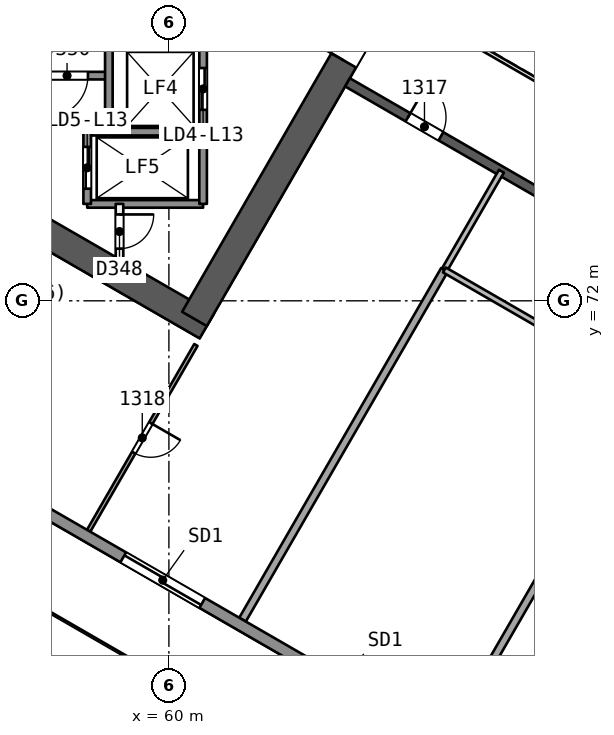
"""IFC4 building model, lengths in metres.
Left out: names, types, materials, properties, quantities, classifications, styles, units other than length and angle.
Written with IfcOpenShell. Run it as: python <this file> out.ifc"""

import sys

from ifc_helpers import new_model, si_unit, direction, frame, frame_2d, origin, place, context, subcontext, project, spatial, rectangle, extrude, element, fill, save


model = new_model("IFC4")
c1 = context("Model", 3, precision=1e-05, world=origin(), true_north=direction((0.0, 1.0)))
c2 = subcontext(c1, "Body", "Model", "MODEL_VIEW")
j1 = project(units=[si_unit("LENGTHUNIT", "METRE"), si_unit("PLANEANGLEUNIT", "RADIAN")], contexts=[c1])
p1 = place(None, origin())
s1 = spatial("IfcSite", under=j1, at=p1, CompositionType="ELEMENT")
p2 = place(p1, origin())
s2 = spatial("IfcBuilding", under=s1, at=p2, CompositionType="ELEMENT")
p3 = place(p2, frame((0.0, 0.0, 61.0)))
s3 = spatial("IfcBuildingStorey", under=s2, at=p3, CompositionType="ELEMENT", Elevation=61.0)
p4 = place(p3, frame((48.772, 78.394, 0.0), z_axis=(0.0, 0.0, 1.0), x_axis=(0.866028339916, -0.499994914436, 0.0)))
e1 = element("IfcWall", 1, at=p4, inside=s3, PredefinedType="SHEAR", context=c2, shape_type="SweptSolid", body=[
    extrude(rectangle(XDim=14.117, YDim=0.75, at=frame_2d((7.059, 0.0))), origin(), (0.0, 0.0, 1.0), 3.7),
])
p5 = place(p3, frame((60.673, 71.523, 0.0), z_axis=(0.0, 0.0, 1.0), x_axis=(0.499997052475, 0.866027105532, 0.0)))
e2 = element("IfcWall", 2, at=p5, inside=s3, PredefinedType="SHEAR", context=c2, shape_type="SweptSolid", body=[
    extrude(rectangle(XDim=10.005, YDim=0.75, at=frame_2d((5.002, 0.0))), origin(), (0.0, 0.0, 1.0), 3.7),
])
p6 = place(p5, frame((7.855, 0.0, 0.0)))
e3 = element("IfcOpeningElement", 3, at=p6, cuts=e2, PredefinedType="OPENING", context=c2, shape_type="SweptSolid", body=[
    extrude(rectangle(XDim=1.2, YDim=2.1, at=frame_2d((0.6, 1.05))), frame((0.0, 0.385, 0.0), z_axis=(0.0, -1.0, 0.0), x_axis=(1.0, 0.0, 0.0)), (0.0, 0.0, 1.0), 0.771),
])
p7 = place(p3, frame((64.7, 77.748, 0.0), z_axis=(0.0, 0.0, 1.0), x_axis=(0.866026492143, -0.499998114903, 0.0)))
e4 = element("IfcWall", 4, at=p7, inside=s3, PredefinedType="SHEAR", context=c2, shape_type="SweptSolid", body=[
    extrude(rectangle(XDim=15.588, YDim=0.25, at=frame_2d((7.794, 0.0))), origin(), (0.0, 0.0, 1.0), 3.2),
])
p8 = place(p7, frame((1.838, 0.0, 0.0)))
e5 = element("IfcOpeningElement", 5, at=p8, cuts=e4, PredefinedType="OPENING", context=c2, shape_type="SweptSolid", body=[
    extrude(rectangle(XDim=1.0, YDim=2.1, at=frame_2d((0.5, 1.05))), frame((0.0, 0.135, 0.0), z_axis=(0.0, -1.0, 0.0), x_axis=(1.0, 0.0, 0.0)), (0.0, 0.0, 1.0), 0.271),
])
p9 = place(p7, frame((8.694, 0.0, 0.0)))
e6 = element("IfcOpeningElement", 6, at=p9, cuts=e4, PredefinedType="OPENING", context=c2, shape_type="SweptSolid", body=[
    extrude(rectangle(XDim=1.1, YDim=2.1, at=frame_2d((0.55, 1.05))), frame((0.0, 0.135, 0.0), z_axis=(0.0, -1.0, 0.0), x_axis=(1.0, 0.0, 0.0)), (0.0, 0.0, 1.0), 0.271),
])
p10 = place(p7, frame((12.75, 0.0, 0.0)))
e7 = element("IfcOpeningElement", 7, at=p10, cuts=e4, PredefinedType="OPENING", context=c2, shape_type="SweptSolid", body=[
    extrude(rectangle(XDim=1.0, YDim=2.1, at=frame_2d((0.5, 1.05))), frame((0.0, 0.135, 0.0), z_axis=(0.0, -1.0, 0.0), x_axis=(1.0, 0.0, 0.0)), (0.0, 0.0, 1.0), 0.271),
])
p11 = place(p3, frame((60.71, 70.838, 0.0), z_axis=(0.0, 0.0, 1.0), x_axis=(-0.49999444814, -0.866028609128, 0.0)))
e8 = element("IfcWall", 8, at=p11, inside=s3, PredefinedType="PARTITIONING", context=c2, shape_type="SweptSolid", body=[
    extrude(rectangle(XDim=5.646, YDim=0.1, at=frame_2d((2.823, 0.0))), origin(), (0.0, 0.0, 1.0), 3.2),
])
p12 = place(p11, frame((2.373, 0.0, 0.0)))
e9 = element("IfcOpeningElement", 9, at=p12, cuts=e8, PredefinedType="OPENING", context=c2, shape_type="SweptSolid", body=[
    extrude(rectangle(XDim=0.9, YDim=2.1, at=frame_2d((0.45, 1.05))), frame((0.0, 0.061, 0.0), z_axis=(0.0, -1.0, 0.0), x_axis=(1.0, 0.0, 0.0)), (0.0, 0.0, 1.0), 0.121),
])
p13 = place(p3, frame((61.938, 63.61, 0.0), z_axis=(0.0, 0.0, 1.0), x_axis=(0.499994284652, 0.866028703517, 0.0)))
e10 = element("IfcWall", 10, at=p13, inside=s3, PredefinedType="PARTITIONING", context=c2, shape_type="SweptSolid", body=[
    extrude(rectangle(XDim=10.625, YDim=0.2, at=frame_2d((5.312, 0.0))), origin(), (0.0, 0.0, 1.0), 3.2),
])
p14 = place(p3, frame((67.25, 72.812, 0.0), z_axis=(0.0, 0.0, 1.0), x_axis=(0.499990139034, 0.866031096941, 0.0)))
e11 = element("IfcWall", 11, at=p14, inside=s3, PredefinedType="PARTITIONING", context=c2, shape_type="SweptSolid", body=[
    extrude(rectangle(XDim=3.0, YDim=0.15, at=frame_2d((1.5, 0.0))), origin(), (0.0, 0.0, 1.0), 3.2),
])
p15 = place(p3, frame((69.761, 71.362, 0.0), z_axis=(0.0, 0.0, 1.0), x_axis=(-0.866032775405, 0.499987231761, 0.0)))
e12 = element("IfcWall", 12, at=p15, inside=s3, PredefinedType="PARTITIONING", context=c2, shape_type="SweptSolid", body=[
    extrude(rectangle(XDim=2.9, YDim=0.15, at=frame_2d((1.45, 0.0))), origin(), (0.0, 0.0, 1.0), 3.2),
])
p16 = place(p3, frame((67.337, 60.493, 0.0), z_axis=(0.0, 0.0, 1.0), x_axis=(0.49999337185, 0.866029230515, 0.0)))
e13 = element("IfcWall", 13, at=p16, inside=s3, PredefinedType="PARTITIONING", context=c2, shape_type="SweptSolid", body=[
    extrude(rectangle(XDim=13.625, YDim=0.2, at=frame_2d((6.812, 0.0))), origin(), (0.0, 0.0, 1.0), 3.2),
])
p17 = place(p3, frame((90.555, 46.916, 0.0), z_axis=(0.0, 0.0, 1.0), x_axis=(-0.866024926003, 0.500000827541, 0.0)))
e14 = element("IfcWall", 14, at=p17, inside=s3, PredefinedType="SOLIDWALL", context=c2, shape_type="SweptSolid", body=[
    extrude(rectangle(XDim=60.025, YDim=0.3, at=frame_2d((30.013, 0.0))), origin(), (0.0, 0.0, 1.0), 3.2),
])
p18 = place(p17, frame((28.813, 0.0, 0.0)))
e15 = element("IfcOpeningElement", 15, at=p18, cuts=e14, PredefinedType="OPENING", context=c2, shape_type="SweptSolid", body=[
    extrude(rectangle(XDim=2.4, YDim=2.4, at=frame_2d((1.2, 1.2))), frame((0.0, 0.161, 0.0), z_axis=(0.0, -1.0, 0.0), x_axis=(1.0, 0.0, 0.0)), (0.0, 0.0, 1.0), 0.321),
])
p19 = place(p17, frame((34.269, 0.0, 0.0)))
e16 = element("IfcOpeningElement", 16, at=p19, cuts=e14, PredefinedType="OPENING", context=c2, shape_type="SweptSolid", body=[
    extrude(rectangle(XDim=2.4, YDim=2.4, at=frame_2d((1.2, 1.2))), frame((0.0, 0.161, 0.0), z_axis=(0.0, -1.0, 0.0), x_axis=(1.0, 0.0, 0.0)), (0.0, 0.0, 1.0), 0.321),
])
p20 = place(p17, frame((46.558, 0.0, 0.0)))
e17 = element("IfcOpeningElement", 17, at=p20, cuts=e14, PredefinedType="OPENING", context=c2, shape_type="SweptSolid", body=[
    extrude(rectangle(XDim=2.4, YDim=2.4, at=frame_2d((1.2, 1.2))), frame((0.0, 0.161, 0.0), z_axis=(0.0, -1.0, 0.0), x_axis=(1.0, 0.0, 0.0)), (0.0, 0.0, 1.0), 0.321),
])
p21 = place(p17, frame((23.357, 0.0, 0.0)))
e18 = element("IfcOpeningElement", 18, at=p21, cuts=e14, PredefinedType="OPENING", context=c2, shape_type="SweptSolid", body=[
    extrude(rectangle(XDim=2.4, YDim=2.4, at=frame_2d((1.2, 1.2))), frame((0.0, 0.161, 0.0), z_axis=(0.0, -1.0, 0.0), x_axis=(1.0, 0.0, 0.0)), (0.0, 0.0, 1.0), 0.321),
])
p22 = place(p17, frame((11.109, 0.0, 0.0)))
e19 = element("IfcOpeningElement", 19, at=p22, cuts=e14, PredefinedType="OPENING", context=c2, shape_type="SweptSolid", body=[
    extrude(rectangle(XDim=2.4, YDim=2.4, at=frame_2d((1.2, 1.2))), frame((0.0, 0.161, 0.0), z_axis=(0.0, -1.0, 0.0), x_axis=(1.0, 0.0, 0.0)), (0.0, 0.0, 1.0), 0.321),
])
p23 = place(p3, frame((58.42, 77.925, 0.0), z_axis=(0.0, 0.0, 1.0), x_axis=(-1.0, 0.0, 0.0)))
e20 = element("IfcWall", 20, at=p23, inside=s3, PredefinedType="SOLIDWALL", context=c2, shape_type="SweptSolid", body=[
    extrude(rectangle(XDim=7.7, YDim=0.2, at=frame_2d((3.85, 0.0))), origin(), (0.0, 0.0, 1.0), 3.2),
])
p24 = place(p23, frame((0.55, 0.0, 0.0)))
e21 = element("IfcOpeningElement", 21, at=p24, cuts=e20, PredefinedType="OPENING", context=c2, shape_type="SweptSolid", body=[
    extrude(rectangle(XDim=1.1, YDim=2.1, at=frame_2d((0.55, 1.05))), frame((0.0, 0.11, 0.0), z_axis=(0.0, -1.0, 0.0), x_axis=(1.0, 0.0, 0.0)), (0.0, 0.0, 1.0), 0.221),
])
for number, where, z_axis, x_axis in (
    (22, (60.9, 76.45, 0.0), (0.0, 0.0, 1.0), (-1.0, 0.0, 0.0)),
    (23, (60.9, 74.55, 0.0), (0.0, 0.0, 1.0), (-1.0, 0.0, 0.0)),
):
    element("IfcWall", number, at=place(p3, frame(where, z_axis=z_axis, x_axis=x_axis)), inside=s3, PredefinedType="SOLIDWALL", context=c2, shape_type="SweptSolid", body=[
        extrude(rectangle(XDim=3.05, YDim=0.2, at=frame_2d((1.525, 0.0))), origin(), (0.0, 0.0, 1.0), 3.2),
    ])
p25 = place(p3, frame((60.9, 85.45, 0.0), z_axis=(0.0, 0.0, 1.0), x_axis=(0.0, -1.0, 0.0)))
e24 = element("IfcWall", 24, at=p25, inside=s3, PredefinedType="SOLIDWALL", context=c2, shape_type="SweptSolid", body=[
    extrude(rectangle(XDim=10.9, YDim=0.2, at=frame_2d((5.45, 0.0))), origin(), (0.0, 0.0, 1.0), 3.2),
])
p26 = place(p25, frame((0.575, 0.0, 0.0)))
e25 = element("IfcOpeningElement", 25, at=p26, cuts=e24, PredefinedType="OPENING", context=c2, shape_type="SweptSolid", body=[
    extrude(rectangle(XDim=1.1, YDim=2.1, at=frame_2d((0.55, 1.05))), frame((0.0, 0.11, 0.0), z_axis=(0.0, -1.0, 0.0), x_axis=(1.0, 0.0, 0.0)), (0.0, 0.0, 1.0), 0.221),
])
p27 = place(p25, frame((2.825, 0.0, 0.0)))
e26 = element("IfcOpeningElement", 26, at=p27, cuts=e24, PredefinedType="OPENING", context=c2, shape_type="SweptSolid", body=[
    extrude(rectangle(XDim=1.1, YDim=2.1, at=frame_2d((0.55, 1.05))), frame((0.0, 0.11, 0.0), z_axis=(0.0, -1.0, 0.0), x_axis=(1.0, 0.0, 0.0)), (0.0, 0.0, 1.0), 0.221),
])
p28 = place(p25, frame((5.075, 0.0, 0.0)))
e27 = element("IfcOpeningElement", 27, at=p28, cuts=e24, PredefinedType="OPENING", context=c2, shape_type="SweptSolid", body=[
    extrude(rectangle(XDim=1.1, YDim=2.1, at=frame_2d((0.55, 1.05))), frame((0.0, 0.11, 0.0), z_axis=(0.0, -1.0, 0.0), x_axis=(1.0, 0.0, 0.0)), (0.0, 0.0, 1.0), 0.221),
])
p29 = place(p25, frame((7.325, 0.0, 0.0)))
e28 = element("IfcOpeningElement", 28, at=p29, cuts=e24, PredefinedType="OPENING", context=c2, shape_type="SweptSolid", body=[
    extrude(rectangle(XDim=1.1, YDim=2.1, at=frame_2d((0.55, 1.05))), frame((0.0, 0.11, 0.0), z_axis=(0.0, -1.0, 0.0), x_axis=(1.0, 0.0, 0.0)), (0.0, 0.0, 1.0), 0.221),
])
p30 = place(p3, frame((58.7, 74.55, 0.0), z_axis=(0.0, 0.0, 1.0), x_axis=(0.0, -1.0, 0.0)))
e29 = element("IfcWall", 29, at=p30, inside=s3, PredefinedType="PARTITIONING", context=c2, shape_type="SweptSolid", body=[
    extrude(rectangle(XDim=1.455, YDim=0.2, at=frame_2d((0.728, 0.0))), origin(), (0.0, 0.0, 1.0), 3.2),
])
p31 = place(p30, frame((0.278, 0.0, 0.0)))
e30 = element("IfcOpeningElement", 30, at=p31, cuts=e29, PredefinedType="OPENING", context=c2, shape_type="SweptSolid", body=[
    extrude(rectangle(XDim=0.9, YDim=2.1, at=frame_2d((0.45, 1.05))), frame((0.0, 0.11, 0.0), z_axis=(0.0, -1.0, 0.0), x_axis=(1.0, 0.0, 0.0)), (0.0, 0.0, 1.0), 0.221),
])
p32 = place(p3, frame((58.42, 85.45, 0.0), z_axis=(0.0, 0.0, 1.0), x_axis=(0.0, -1.0, 0.0)))
e31 = element("IfcWall", 31, at=p32, inside=s3, PredefinedType="SOLIDWALL", context=c2, shape_type="SweptSolid", body=[
    extrude(rectangle(XDim=9.0, YDim=0.2, at=frame_2d((4.5, 0.0))), origin(), (0.0, 0.0, 1.0), 3.2),
])
p33 = place(p3, frame((57.85, 76.45, 0.0), z_axis=(0.0, 0.0, 1.0), x_axis=(0.0, -1.0, 0.0)))
e32 = element("IfcWall", 32, at=p33, inside=s3, PredefinedType="SOLIDWALL", context=c2, shape_type="SweptSolid", body=[
    extrude(rectangle(XDim=1.9, YDim=0.2, at=frame_2d((0.95, 0.0))), origin(), (0.0, 0.0, 1.0), 3.2),
])
p34 = place(p33, frame((0.4, 0.0, 0.0)))
e33 = element("IfcOpeningElement", 33, at=p34, cuts=e32, PredefinedType="OPENING", context=c2, shape_type="SweptSolid", body=[
    extrude(rectangle(XDim=1.1, YDim=2.1, at=frame_2d((0.55, 1.05))), frame((0.0, 0.11, 0.0), z_axis=(0.0, -1.0, 0.0), x_axis=(1.0, 0.0, 0.0)), (0.0, 0.0, 1.0), 0.221),
])
p35 = place(p3, frame((67.702, 78.948, 0.0), z_axis=(0.0, 0.0, 1.0), x_axis=(0.866026658274, -0.499997827154, 0.0)))
e34 = element("IfcWall", 34, at=p35, inside=s3, PredefinedType="PARTITIONING", context=c2, shape_type="SweptSolid", body=[
    extrude(rectangle(XDim=11.588, YDim=0.1, at=frame_2d((5.794, 0.0))), origin(), (0.0, 0.0, 1.0), 3.2),
])
p36 = place(p8, origin())
e35 = element("IfcDoor", 35, at=p36, inside=s3, OperationType="SINGLE_SWING_LEFT", PredefinedType="NOTDEFINED", context=c2, shape_type="SweptSolid", body=[
    extrude(rectangle(XDim=1.0, YDim=2.1, at=frame_2d((0.5, 1.05))), frame((0.0, 0.025, 0.0), z_axis=(0.0, -1.0, 0.0), x_axis=(1.0, 0.0, 0.0)), (0.0, 0.0, 1.0), 0.05),
])
fill(e5, e35)
p37 = place(p12, origin())
e36 = element("IfcDoor", 36, at=p37, inside=s3, OperationType="SINGLE_SWING_LEFT", PredefinedType="NOTDEFINED", context=c2, shape_type="SweptSolid", body=[
    extrude(rectangle(XDim=0.9, YDim=2.1, at=frame_2d((0.45, 1.05))), frame((0.0, 0.025, 0.0), z_axis=(0.0, -1.0, 0.0), x_axis=(1.0, 0.0, 0.0)), (0.0, 0.0, 1.0), 0.05),
])
fill(e9, e36)
p38 = place(p19, origin())
e37 = element("IfcDoor", 37, at=p38, inside=s3, OperationType="SLIDING_TO_RIGHT", PredefinedType="NOTDEFINED", context=c2, shape_type="SweptSolid", body=[
    extrude(rectangle(XDim=2.4, YDim=2.4, at=frame_2d((1.2, 1.2))), frame((0.0, 0.025, 0.0), z_axis=(0.0, -1.0, 0.0), x_axis=(1.0, 0.0, 0.0)), (0.0, 0.0, 1.0), 0.05),
])
fill(e16, e37)
p39 = place(p6, origin())
e38 = element("IfcDoor", 38, at=p39, inside=s3, OperationType="SINGLE_SWING_LEFT", PredefinedType="NOTDEFINED", context=c2, shape_type="SweptSolid", body=[
    extrude(rectangle(XDim=1.2, YDim=2.1, at=frame_2d((0.6, 1.05))), frame((0.0, 0.025, 0.0), z_axis=(0.0, -1.0, 0.0), x_axis=(1.0, 0.0, 0.0)), (0.0, 0.0, 1.0), 0.05),
])
fill(e3, e38)
p40 = place(p29, origin())
e39 = element("IfcDoor", 39, at=p40, inside=s3, OperationType="SLIDING_TO_LEFT", PredefinedType="NOTDEFINED", context=c2, shape_type="SweptSolid", body=[
    extrude(rectangle(XDim=1.1, YDim=2.1, at=frame_2d((0.55, 1.05))), frame((0.0, 0.025, 0.0), z_axis=(0.0, -1.0, 0.0), x_axis=(1.0, 0.0, 0.0)), (0.0, 0.0, 1.0), 0.05),
])
fill(e28, e39)
p41 = place(p34, origin())
e40 = element("IfcDoor", 40, at=p41, inside=s3, OperationType="SLIDING_TO_RIGHT", PredefinedType="NOTDEFINED", context=c2, shape_type="SweptSolid", body=[
    extrude(rectangle(XDim=1.1, YDim=2.1, at=frame_2d((0.55, 1.05))), frame((0.0, 0.025, 0.0), z_axis=(0.0, -1.0, 0.0), x_axis=(1.0, 0.0, 0.0)), (0.0, 0.0, 1.0), 0.05),
])
fill(e33, e40)
p42 = place(p31, origin())
e41 = element("IfcDoor", 41, at=p42, inside=s3, OperationType="SINGLE_SWING_LEFT", PredefinedType="NOTDEFINED", context=c2, shape_type="SweptSolid", body=[
    extrude(rectangle(XDim=0.9, YDim=2.1, at=frame_2d((0.45, 1.05))), frame((0.0, 0.025, 0.0), z_axis=(0.0, -1.0, 0.0), x_axis=(1.0, 0.0, 0.0)), (0.0, 0.0, 1.0), 0.05),
])
fill(e30, e41)
p43 = place(p24, origin())
e42 = element("IfcDoor", 42, at=p43, inside=s3, OperationType="SINGLE_SWING_RIGHT", PredefinedType="NOTDEFINED", context=c2, shape_type="SweptSolid", body=[
    extrude(rectangle(XDim=1.1, YDim=2.1, at=frame_2d((0.55, 1.05))), frame((0.0, 0.025, 0.0), z_axis=(0.0, -1.0, 0.0), x_axis=(1.0, 0.0, 0.0)), (0.0, 0.0, 1.0), 0.05),
])
fill(e21, e42)
save(model, sys.argv[1])
